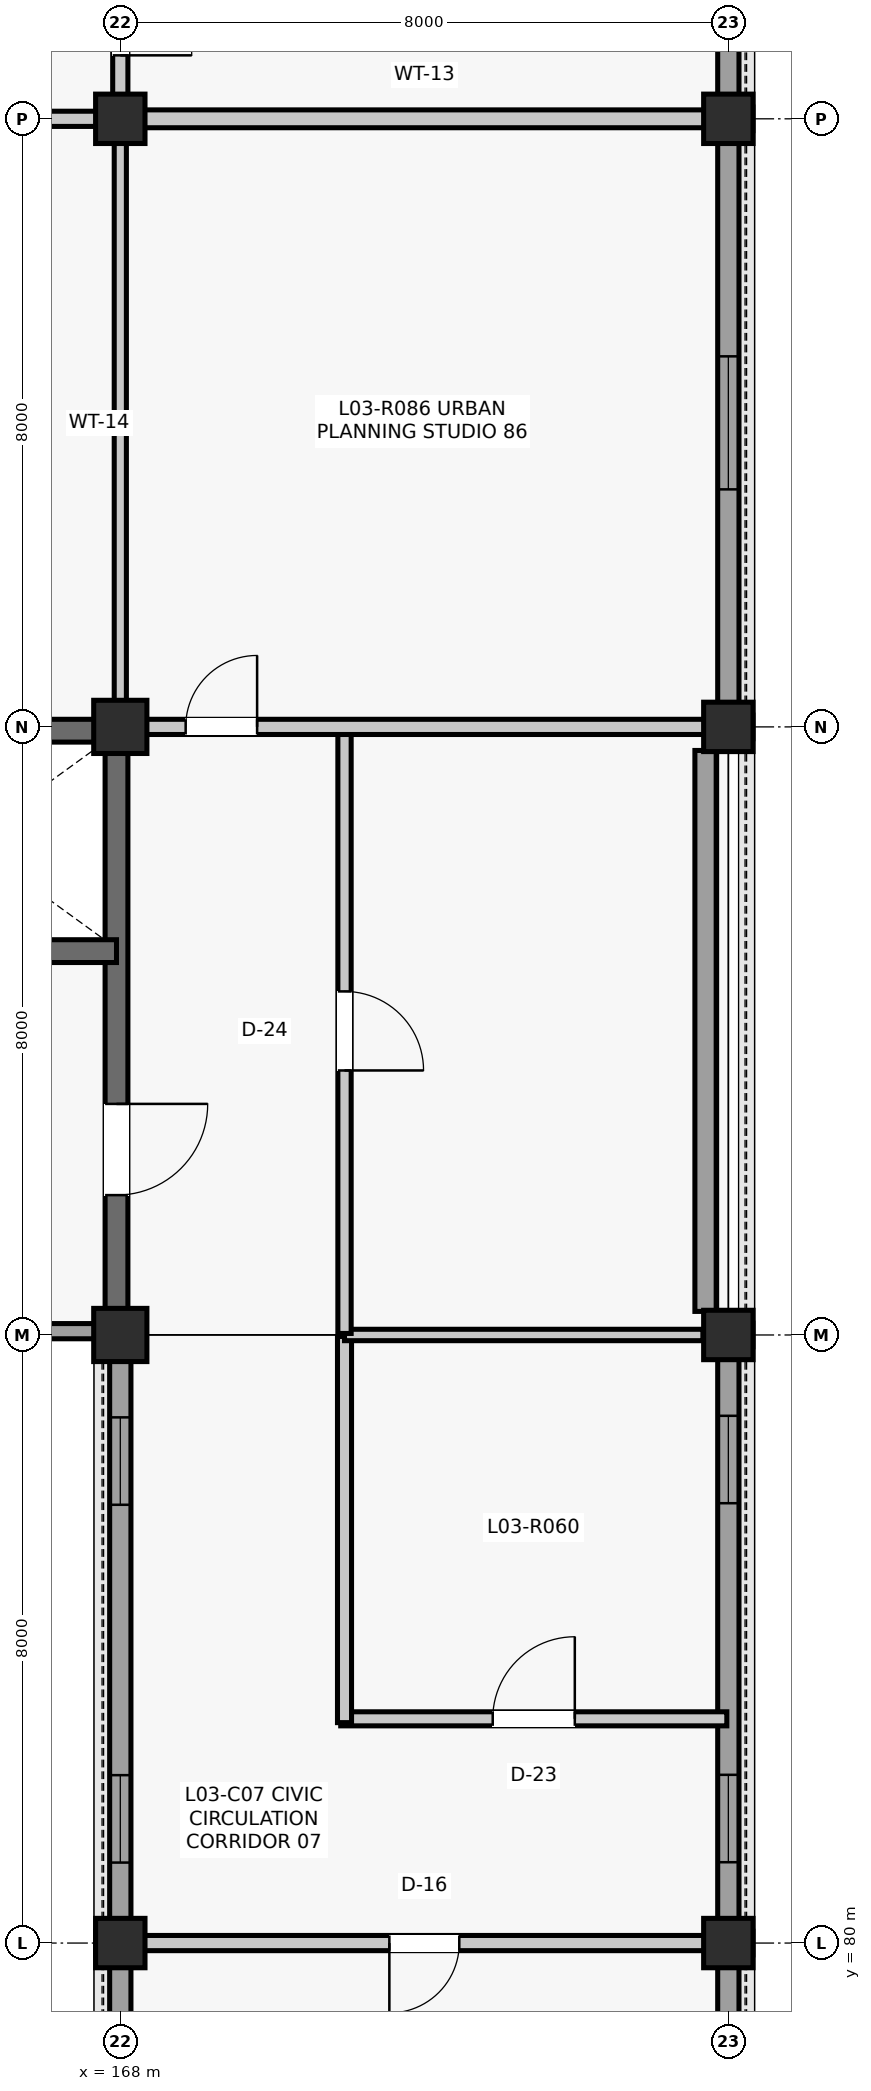
"""IFC4 building model, lengths in metres.
Left out: names, types, materials, properties, quantities, classifications, styles, units other than length and angle.
Written with IfcOpenShell. Run it as: python <this file> out.ifc"""

import sys

from ifc_helpers import new_model, si_unit, direction, frame, frame_2d, origin, origin_2d, place, context, subcontext, project, spatial, rectangle, extrude, element, fill, save


model = new_model("IFC4")
c1 = context("Model", 3, precision=1e-05, world=origin(), true_north=direction((0.0, 1.0)))
c2 = subcontext(c1, "Body", "Model", "MODEL_VIEW")
j1 = project(units=[si_unit("LENGTHUNIT", "METRE"), si_unit("PLANEANGLEUNIT", "RADIAN")], contexts=[c1])
p1 = place(None, origin())
s1 = spatial("IfcSite", under=j1, at=p1, CompositionType="ELEMENT")
p2 = place(p1, origin())
s2 = spatial("IfcBuilding", under=s1, at=p2, CompositionType="ELEMENT")
p3 = place(p2, frame((0.0, 0.0, 13.86)))
s3 = spatial("IfcBuildingStorey", under=s2, at=p3, CompositionType="ELEMENT", Elevation=13.86)
p4 = place(p3, frame((168.0, 80.0, 0.0), z_axis=(0.0, 0.0, 1.0), x_axis=(1.0, 0.0, 0.0)))
e1 = element("IfcColumn", 1, at=p4, inside=s3, PredefinedType="COLUMN", context=c2, shape_type="SweptSolid", body=[
    extrude(rectangle(XDim=0.65, YDim=0.65, at=origin_2d()), origin(), (0.0, 0.0, 1.0), 3.96),
])
for number, where, z_axis, x_axis in (
    (2, (168.0, 88.0, 0.0), (0.0, 0.0, 1.0), (1.0, 0.0, 0.0)),
    (3, (168.0, 96.0, 0.0), (0.0, 0.0, 1.0), (1.0, 0.0, 0.0)),
):
    element("IfcColumn", number, at=place(p3, frame(where, z_axis=z_axis, x_axis=x_axis)), inside=s3, PredefinedType="COLUMN", context=c2, shape_type="SweptSolid", body=[
        extrude(rectangle(XDim=0.7, YDim=0.7, at=origin_2d()), origin(), (0.0, 0.0, 1.0), 3.96),
    ])
for number, where, z_axis, x_axis in (
    (4, (168.0, 104.0, 0.0), (0.0, 0.0, 1.0), (1.0, 0.0, 0.0)),
    (5, (176.0, 80.0, 0.0), (0.0, 0.0, 1.0), (1.0, 0.0, 0.0)),
    (6, (176.0, 88.0, 0.0), (0.0, 0.0, 1.0), (1.0, 0.0, 0.0)),
    (7, (176.0, 96.0, 0.0), (0.0, 0.0, 1.0), (1.0, 0.0, 0.0)),
    (8, (176.0, 104.0, 0.0), (0.0, 0.0, 1.0), (1.0, 0.0, 0.0)),
):
    element("IfcColumn", number, at=place(p3, frame(where, z_axis=z_axis, x_axis=x_axis)), inside=s3, PredefinedType="COLUMN", context=c2, shape_type="SweptSolid", body=[
        extrude(rectangle(XDim=0.65, YDim=0.65, at=origin_2d()), origin(), (0.0, 0.0, 1.0), 3.96),
    ])
p5 = place(p3, frame((168.0, 72.26, 0.0), z_axis=(0.0, 0.0, 1.0), x_axis=(0.0, 1.0, 0.0)))
e9 = element("IfcWall", 9, at=p5, inside=s3, PredefinedType="SOLIDWALL", context=c2, shape_type="SweptSolid", body=[
    extrude(rectangle(XDim=7.43, YDim=0.28, at=frame_2d((3.715, 0.0))), origin(), (0.0, 0.0, 1.0), 3.364),
])
p6 = place(p5, frame((2.615, 0.0, 1.35)))
e10 = element("IfcOpeningElement", 10, at=p6, cuts=e9, PredefinedType="OPENING", context=c2, shape_type="SweptSolid", body=[
    extrude(rectangle(XDim=2.2, YDim=1.3, at=frame_2d((1.1, 0.65))), frame((0.0, 0.15, 0.0), z_axis=(0.0, -1.0, 0.0), x_axis=(1.0, 0.0, 0.0)), (0.0, 0.0, 1.0), 0.3),
])
p7 = place(p3, frame((176.0, 72.26, 0.0), z_axis=(0.0, 0.0, 1.0), x_axis=(0.0, 1.0, 0.0)))
e11 = element("IfcWall", 11, at=p7, inside=s3, PredefinedType="SOLIDWALL", context=c2, shape_type="SweptSolid", body=[
    extrude(rectangle(XDim=7.43, YDim=0.28, at=frame_2d((3.715, 0.0))), origin(), (0.0, 0.0, 1.0), 3.304),
])
p8 = place(p7, frame((2.615, 0.0, 1.35)))
e12 = element("IfcOpeningElement", 12, at=p8, cuts=e11, PredefinedType="OPENING", context=c2, shape_type="SweptSolid", body=[
    extrude(rectangle(XDim=2.2, YDim=1.3, at=frame_2d((1.1, 0.65))), frame((0.0, 0.15, 0.0), z_axis=(0.0, -1.0, 0.0), x_axis=(1.0, 0.0, 0.0)), (0.0, 0.0, 1.0), 0.3),
])
p9 = place(p3, frame((168.0, 80.31, 0.0), z_axis=(0.0, 0.0, 1.0), x_axis=(0.0, 1.0, 0.0)))
e13 = element("IfcWall", 13, at=p9, inside=s3, PredefinedType="SOLIDWALL", context=c2, shape_type="SweptSolid", body=[
    extrude(rectangle(XDim=7.355, YDim=0.28, at=frame_2d((3.677, 0.0))), origin(), (0.0, 0.0, 1.0), 3.304),
])
p10 = place(p9, frame((0.749, 0.0, 0.95)))
e14 = element("IfcOpeningElement", 14, at=p10, cuts=e13, PredefinedType="OPENING", context=c2, shape_type="SweptSolid", body=[
    extrude(rectangle(XDim=1.15, YDim=1.65, at=frame_2d((0.575, 0.825))), frame((0.0, 0.15, 0.0), z_axis=(0.0, -1.0, 0.0), x_axis=(1.0, 0.0, 0.0)), (0.0, 0.0, 1.0), 0.3),
])
p11 = place(p9, frame((5.456, 0.0, 0.95)))
e15 = element("IfcOpeningElement", 15, at=p11, cuts=e13, PredefinedType="OPENING", context=c2, shape_type="SweptSolid", body=[
    extrude(rectangle(XDim=1.15, YDim=1.65, at=frame_2d((0.575, 0.825))), frame((0.0, 0.15, 0.0), z_axis=(0.0, -1.0, 0.0), x_axis=(1.0, 0.0, 0.0)), (0.0, 0.0, 1.0), 0.3),
])
p12 = place(p3, frame((176.0, 80.31, 0.0), z_axis=(0.0, 0.0, 1.0), x_axis=(0.0, 1.0, 0.0)))
e16 = element("IfcWall", 16, at=p12, inside=s3, PredefinedType="SOLIDWALL", context=c2, shape_type="SweptSolid", body=[
    extrude(rectangle(XDim=7.38, YDim=0.28, at=frame_2d((3.69, 0.0))), origin(), (0.0, 0.0, 1.0), 3.367),
])
p13 = place(p12, frame((0.753, 0.0, 0.95)))
e17 = element("IfcOpeningElement", 17, at=p13, cuts=e16, PredefinedType="OPENING", context=c2, shape_type="SweptSolid", body=[
    extrude(rectangle(XDim=1.15, YDim=1.65, at=frame_2d((0.575, 0.825))), frame((0.0, 0.15, 0.0), z_axis=(0.0, -1.0, 0.0), x_axis=(1.0, 0.0, 0.0)), (0.0, 0.0, 1.0), 0.3),
])
p14 = place(p12, frame((5.477, 0.0, 0.95)))
e18 = element("IfcOpeningElement", 18, at=p14, cuts=e16, PredefinedType="OPENING", context=c2, shape_type="SweptSolid", body=[
    extrude(rectangle(XDim=1.15, YDim=1.65, at=frame_2d((0.575, 0.825))), frame((0.0, 0.15, 0.0), z_axis=(0.0, -1.0, 0.0), x_axis=(1.0, 0.0, 0.0)), (0.0, 0.0, 1.0), 0.3),
])
p15 = place(p3, frame((175.7, 88.31, 0.0), z_axis=(0.0, 0.0, 1.0), x_axis=(0.0, 1.0, 0.0)))
e19 = element("IfcWall", 19, at=p15, inside=s3, PredefinedType="SOLIDWALL", context=c2, shape_type="SweptSolid", body=[
    extrude(rectangle(XDim=7.38, YDim=0.28, at=frame_2d((3.69, 0.0))), origin(), (0.0, 0.0, 1.0), 3.3),
])
p16 = place(p3, frame((176.0, 96.31, 0.0), z_axis=(0.0, 0.0, 1.0), x_axis=(0.0, 1.0, 0.0)))
e20 = element("IfcWall", 20, at=p16, inside=s3, PredefinedType="SOLIDWALL", context=c2, shape_type="SweptSolid", body=[
    extrude(rectangle(XDim=7.38, YDim=0.28, at=frame_2d((3.69, 0.0))), origin(), (0.0, 0.0, 1.0), 3.364),
])
p17 = place(p16, frame((2.815, 0.0, 0.9)))
e21 = element("IfcOpeningElement", 21, at=p17, cuts=e20, PredefinedType="OPENING", context=c2, shape_type="SweptSolid", body=[
    extrude(rectangle(XDim=1.75, YDim=1.85, at=frame_2d((0.875, 0.925))), frame((0.0, 0.15, 0.0), z_axis=(0.0, -1.0, 0.0), x_axis=(1.0, 0.0, 0.0)), (0.0, 0.0, 1.0), 0.3),
])
p18 = place(p3, frame((176.0, 104.31, 0.0), z_axis=(0.0, 0.0, 1.0), x_axis=(0.0, 1.0, 0.0)))
e22 = element("IfcWall", 22, at=p18, inside=s3, PredefinedType="SOLIDWALL", context=c2, shape_type="SweptSolid", body=[
    extrude(rectangle(XDim=7.38, YDim=0.28, at=frame_2d((3.69, 0.0))), origin(), (0.0, 0.0, 1.0), 3.304),
])
p19 = place(p18, frame((2.59, 0.0, 1.35)))
e23 = element("IfcOpeningElement", 23, at=p19, cuts=e22, PredefinedType="OPENING", context=c2, shape_type="SweptSolid", body=[
    extrude(rectangle(XDim=2.2, YDim=1.3, at=frame_2d((1.1, 0.65))), frame((0.0, 0.15, 0.0), z_axis=(0.0, -1.0, 0.0), x_axis=(1.0, 0.0, 0.0)), (0.0, 0.0, 1.0), 0.3),
])
p20 = place(p3, frame((160.24, 95.95, 0.0), z_axis=(0.0, 0.0, 1.0), x_axis=(1.0, 0.0, 0.0)))
e24 = element("IfcWall", 24, at=p20, inside=s3, PredefinedType="SHEAR", context=c2, shape_type="SweptSolid", body=[
    extrude(rectangle(XDim=7.52, YDim=0.3, at=frame_2d((3.76, 0.0))), origin(), (0.0, 0.0, 1.0), 3.725),
])
p21 = place(p3, frame((167.95, 88.24, 0.0), z_axis=(0.0, 0.0, 1.0), x_axis=(0.0, 1.0, 0.0)))
e25 = element("IfcWall", 25, at=p21, inside=s3, PredefinedType="SHEAR", context=c2, shape_type="SweptSolid", body=[
    extrude(rectangle(XDim=7.52, YDim=0.3, at=frame_2d((3.76, 0.0))), origin(), (0.0, 0.0, 1.0), 3.725),
])
p22 = place(p21, frame((1.6, 0.0, 0.0)))
e26 = element("IfcOpeningElement", 26, at=p22, cuts=e25, PredefinedType="OPENING", context=c2, shape_type="SweptSolid", body=[
    extrude(rectangle(XDim=1.2, YDim=2.15, at=frame_2d((0.6, 1.075))), frame((0.0, 0.16, 0.0), z_axis=(0.0, -1.0, 0.0), x_axis=(1.0, 0.0, 0.0)), (0.0, 0.0, 1.0), 0.32),
])
p23 = place(p3, frame((164.0, 93.05, 0.0), z_axis=(0.0, 0.0, 1.0), x_axis=(1.0, 0.0, 0.0)))
e27 = element("IfcWall", 27, at=p23, inside=s3, PredefinedType="SHEAR", context=c2, shape_type="SweptSolid", body=[
    extrude(rectangle(XDim=3.95, YDim=0.3, at=frame_2d((1.975, 0.0))), origin(), (0.0, 0.0, 1.0), 3.725),
])
p24 = place(p23, frame((1.375, 0.0, 0.0)))
e28 = element("IfcOpeningElement", 28, at=p24, cuts=e27, PredefinedType="OPENING", context=c2, shape_type="SweptSolid", body=[
    extrude(rectangle(XDim=1.2, YDim=2.2, at=frame_2d((0.6, 1.1))), frame((0.0, 0.16, 0.0), z_axis=(0.0, -1.0, 0.0), x_axis=(1.0, 0.0, 0.0)), (0.0, 0.0, 1.0), 0.32),
])
p25 = place(p3, frame((164.0, 88.05, 0.0), z_axis=(0.0, 0.0, 1.0), x_axis=(1.0, 0.0, 0.0)))
e29 = element("IfcWall", 29, at=p25, inside=s3, PredefinedType="PARTITIONING", context=c2, shape_type="SweptSolid", body=[
    extrude(rectangle(XDim=3.66, YDim=0.2, at=frame_2d((1.83, 0.0))), origin(), (0.0, 0.0, 1.0), 3.297),
])
p26 = place(p3, frame((170.9, 82.95, 0.0), z_axis=(0.0, 0.0, 1.0), x_axis=(1.0, 0.0, 0.0)))
e30 = element("IfcWall", 30, at=p26, inside=s3, PredefinedType="PARTITIONING", context=c2, shape_type="SweptSolid", body=[
    extrude(rectangle(XDim=5.08, YDim=0.185, at=frame_2d((2.54, 0.0))), origin(), (0.0, 0.0, 1.0), 3.36),
])
p27 = place(p26, frame((2.0, 0.0, 0.0)))
e31 = element("IfcOpeningElement", 31, at=p27, cuts=e30, PredefinedType="OPENING", context=c2, shape_type="SweptSolid", body=[
    extrude(rectangle(XDim=1.08, YDim=2.2, at=frame_2d((0.54, 1.1))), frame((0.0, 0.103, 0.0), z_axis=(0.0, -1.0, 0.0), x_axis=(1.0, 0.0, 0.0)), (0.0, 0.0, 1.0), 0.205),
])
p28 = place(p3, frame((170.95, 82.9, 0.0), z_axis=(0.0, 0.0, 1.0), x_axis=(0.0, 1.0, 0.0)))
e32 = element("IfcWall", 32, at=p28, inside=s3, PredefinedType="PARTITIONING", context=c2, shape_type="SweptSolid", body=[
    extrude(rectangle(XDim=5.08, YDim=0.185, at=frame_2d((2.54, 0.0))), origin(), (0.0, 0.0, 1.0), 3.247),
])
p29 = place(p3, frame((170.95, 88.0, 0.0), z_axis=(0.0, 0.0, 1.0), x_axis=(1.0, 0.0, 0.0)))
e33 = element("IfcWall", 33, at=p29, inside=s3, PredefinedType="PARTITIONING", context=c2, shape_type="SweptSolid", body=[
    extrude(rectangle(XDim=4.715, YDim=0.15, at=frame_2d((2.357, 0.0))), origin(), (0.0, 0.0, 1.0), 3.247),
])
p30 = place(p3, frame((170.95, 88.02, 0.0), z_axis=(0.0, 0.0, 1.0), x_axis=(0.0, 1.0, 0.0)))
e34 = element("IfcWall", 34, at=p30, inside=s3, PredefinedType="PARTITIONING", context=c2, shape_type="SweptSolid", body=[
    extrude(rectangle(XDim=7.96, YDim=0.175, at=frame_2d((3.98, 0.0))), origin(), (0.0, 0.0, 1.0), 3.247),
])
p31 = place(p30, frame((3.46, 0.0, 0.0)))
e35 = element("IfcOpeningElement", 35, at=p31, cuts=e34, PredefinedType="OPENING", context=c2, shape_type="SweptSolid", body=[
    extrude(rectangle(XDim=1.04, YDim=2.18, at=frame_2d((0.52, 1.09))), frame((0.0, 0.097, 0.0), z_axis=(0.0, -1.0, 0.0), x_axis=(1.0, 0.0, 0.0)), (0.0, 0.0, 1.0), 0.195),
])
p32 = place(p3, frame((168.0, 96.34, 0.0), z_axis=(0.0, 0.0, 1.0), x_axis=(0.0, 1.0, 0.0)))
e36 = element("IfcWall", 36, at=p32, inside=s3, PredefinedType="PARTITIONING", context=c2, shape_type="SweptSolid", body=[
    extrude(rectangle(XDim=7.345, YDim=0.16, at=frame_2d((3.672, 0.0))), origin(), (0.0, 0.0, 1.0), 3.247),
])
p33 = place(p3, frame((160.315, 104.0, 0.0), z_axis=(0.0, 0.0, 1.0), x_axis=(1.0, 0.0, 0.0)))
e37 = element("IfcWall", 37, at=p33, inside=s3, PredefinedType="PARTITIONING", context=c2, shape_type="SweptSolid", body=[
    extrude(rectangle(XDim=7.37, YDim=0.2, at=frame_2d((3.685, 0.0))), origin(), (0.0, 0.0, 1.0), 3.253),
])
p34 = place(p33, frame((1.367, 0.0, 0.0)))
e38 = element("IfcOpeningElement", 38, at=p34, cuts=e37, PredefinedType="OPENING", context=c2, shape_type="SweptSolid", body=[
    extrude(rectangle(XDim=0.95, YDim=2.1, at=frame_2d((0.475, 1.05))), frame((0.0, 0.11, 0.0), z_axis=(0.0, -1.0, 0.0), x_axis=(1.0, 0.0, 0.0)), (0.0, 0.0, 1.0), 0.22),
])
p35 = place(p33, frame((5.421, 0.0, 0.0)))
e39 = element("IfcOpeningElement", 39, at=p35, cuts=e37, PredefinedType="OPENING", context=c2, shape_type="SweptSolid", body=[
    extrude(rectangle(XDim=0.95, YDim=2.1, at=frame_2d((0.475, 1.05))), frame((0.0, 0.11, 0.0), z_axis=(0.0, -1.0, 0.0), x_axis=(1.0, 0.0, 0.0)), (0.0, 0.0, 1.0), 0.22),
])
p36 = place(p3, frame((168.0, 104.315, 0.0), z_axis=(0.0, 0.0, 1.0), x_axis=(0.0, 1.0, 0.0)))
e40 = element("IfcWall", 40, at=p36, inside=s3, PredefinedType="PARTITIONING", context=c2, shape_type="SweptSolid", body=[
    extrude(rectangle(XDim=7.37, YDim=0.2, at=frame_2d((3.685, 0.0))), origin(), (0.0, 0.0, 1.0), 3.253),
])
p37 = place(p36, frame((0.52, 0.0, 0.0)))
e41 = element("IfcOpeningElement", 41, at=p37, cuts=e40, PredefinedType="OPENING", context=c2, shape_type="SweptSolid", body=[
    extrude(rectangle(XDim=0.94, YDim=2.12, at=frame_2d((0.47, 1.06))), frame((0.0, 0.11, 0.0), z_axis=(0.0, -1.0, 0.0), x_axis=(1.0, 0.0, 0.0)), (0.0, 0.0, 1.0), 0.22),
])
p38 = place(p3, frame((168.315, 80.0, 0.0), z_axis=(0.0, 0.0, 1.0), x_axis=(1.0, 0.0, 0.0)))
e42 = element("IfcWall", 42, at=p38, inside=s3, PredefinedType="PARTITIONING", context=c2, shape_type="SweptSolid", body=[
    extrude(rectangle(XDim=7.37, YDim=0.2, at=frame_2d((3.685, 0.0))), origin(), (0.0, 0.0, 1.0), 3.452),
])
p39 = place(p38, frame((3.225, 0.0, 0.0)))
e43 = element("IfcOpeningElement", 43, at=p39, cuts=e42, PredefinedType="OPENING", context=c2, shape_type="SweptSolid", body=[
    extrude(rectangle(XDim=0.92, YDim=2.1, at=frame_2d((0.46, 1.05))), frame((0.0, 0.11, 0.0), z_axis=(0.0, -1.0, 0.0), x_axis=(1.0, 0.0, 0.0)), (0.0, 0.0, 1.0), 0.22),
])
p40 = place(p3, frame((168.34, 96.0, 0.0), z_axis=(0.0, 0.0, 1.0), x_axis=(1.0, 0.0, 0.0)))
e44 = element("IfcWall", 44, at=p40, inside=s3, PredefinedType="PARTITIONING", context=c2, shape_type="SweptSolid", body=[
    extrude(rectangle(XDim=7.345, YDim=0.2, at=frame_2d((3.672, 0.0))), origin(), (0.0, 0.0, 1.0), 3.253),
])
p41 = place(p40, frame((0.52, 0.0, 0.0)))
e45 = element("IfcOpeningElement", 45, at=p41, cuts=e44, PredefinedType="OPENING", context=c2, shape_type="SweptSolid", body=[
    extrude(rectangle(XDim=0.94, YDim=2.12, at=frame_2d((0.47, 1.06))), frame((0.0, 0.11, 0.0), z_axis=(0.0, -1.0, 0.0), x_axis=(1.0, 0.0, 0.0)), (0.0, 0.0, 1.0), 0.22),
])
p42 = place(p3, frame((168.315, 104.0, 0.0), z_axis=(0.0, 0.0, 1.0), x_axis=(1.0, 0.0, 0.0)))
e46 = element("IfcWall", 46, at=p42, inside=s3, PredefinedType="PARTITIONING", context=c2, shape_type="SweptSolid", body=[
    extrude(rectangle(XDim=7.37, YDim=0.235, at=frame_2d((3.685, 0.0))), origin(), (0.0, 0.0, 1.0), 3.241),
])
p43 = place(p10, origin())
e47 = element("IfcWindow", 47, at=p43, inside=s3, PartitioningType="SINGLE_PANEL", PredefinedType="WINDOW", context=c2, shape_type="SweptSolid", body=[
    extrude(rectangle(XDim=1.15, YDim=1.65, at=frame_2d((0.575, 0.825))), frame((0.0, 0.03, 0.0), z_axis=(0.0, -1.0, 0.0), x_axis=(1.0, 0.0, 0.0)), (0.0, 0.0, 1.0), 0.06),
])
fill(e14, e47)
p44 = place(p11, origin())
e48 = element("IfcWindow", 48, at=p44, inside=s3, PartitioningType="SINGLE_PANEL", PredefinedType="WINDOW", context=c2, shape_type="SweptSolid", body=[
    extrude(rectangle(XDim=1.15, YDim=1.65, at=frame_2d((0.575, 0.825))), frame((0.0, 0.03, 0.0), z_axis=(0.0, -1.0, 0.0), x_axis=(1.0, 0.0, 0.0)), (0.0, 0.0, 1.0), 0.06),
])
fill(e15, e48)
p45 = place(p13, origin())
e49 = element("IfcWindow", 49, at=p45, inside=s3, PartitioningType="SINGLE_PANEL", PredefinedType="WINDOW", context=c2, shape_type="SweptSolid", body=[
    extrude(rectangle(XDim=1.15, YDim=1.65, at=frame_2d((0.575, 0.825))), frame((0.0, 0.03, 0.0), z_axis=(0.0, -1.0, 0.0), x_axis=(1.0, 0.0, 0.0)), (0.0, 0.0, 1.0), 0.06),
])
fill(e17, e49)
p46 = place(p14, origin())
e50 = element("IfcWindow", 50, at=p46, inside=s3, PartitioningType="SINGLE_PANEL", PredefinedType="WINDOW", context=c2, shape_type="SweptSolid", body=[
    extrude(rectangle(XDim=1.15, YDim=1.65, at=frame_2d((0.575, 0.825))), frame((0.0, 0.03, 0.0), z_axis=(0.0, -1.0, 0.0), x_axis=(1.0, 0.0, 0.0)), (0.0, 0.0, 1.0), 0.06),
])
fill(e18, e50)
p47 = place(p17, origin())
e51 = element("IfcWindow", 51, at=p47, inside=s3, PartitioningType="SINGLE_PANEL", PredefinedType="WINDOW", context=c2, shape_type="SweptSolid", body=[
    extrude(rectangle(XDim=1.75, YDim=1.85, at=frame_2d((0.875, 0.925))), frame((0.0, 0.03, 0.0), z_axis=(0.0, -1.0, 0.0), x_axis=(1.0, 0.0, 0.0)), (0.0, 0.0, 1.0), 0.06),
])
fill(e21, e51)
p48 = place(p22, frame((1.2, 0.0, 0.0), z_axis=(0.0, 0.0, 1.0), x_axis=(-1.0, 0.0, 0.0)))
e52 = element("IfcDoor", 52, at=p48, inside=s3, OperationType="SINGLE_SWING_RIGHT", PredefinedType="DOOR", context=c2, shape_type="SweptSolid", body=[
    extrude(rectangle(XDim=1.2, YDim=2.15, at=frame_2d((0.6, 1.075))), frame((0.0, 0.025, 0.0), z_axis=(0.0, -1.0, 0.0), x_axis=(1.0, 0.0, 0.0)), (0.0, 0.0, 1.0), 0.05),
])
fill(e26, e52)
p49 = place(p27, origin())
e53 = element("IfcDoor", 53, at=p49, inside=s3, OperationType="SINGLE_SWING_RIGHT", PredefinedType="DOOR", context=c2, shape_type="SweptSolid", body=[
    extrude(rectangle(XDim=1.08, YDim=2.2, at=frame_2d((0.54, 1.1))), frame((0.0, 0.025, 0.0), z_axis=(0.0, -1.0, 0.0), x_axis=(1.0, 0.0, 0.0)), (0.0, 0.0, 1.0), 0.05),
])
fill(e31, e53)
p50 = place(p31, frame((1.04, 0.0, 0.0), z_axis=(0.0, 0.0, 1.0), x_axis=(-1.0, 0.0, 0.0)))
e54 = element("IfcDoor", 54, at=p50, inside=s3, OperationType="SINGLE_SWING_LEFT", PredefinedType="DOOR", context=c2, shape_type="SweptSolid", body=[
    extrude(rectangle(XDim=1.04, YDim=2.18, at=frame_2d((0.52, 1.09))), frame((0.0, 0.025, 0.0), z_axis=(0.0, -1.0, 0.0), x_axis=(1.0, 0.0, 0.0)), (0.0, 0.0, 1.0), 0.05),
])
fill(e35, e54)
p51 = place(p37, frame((0.94, 0.0, 0.0), z_axis=(0.0, 0.0, 1.0), x_axis=(-1.0, 0.0, 0.0)))
e55 = element("IfcDoor", 55, at=p51, inside=s3, OperationType="SINGLE_SWING_LEFT", PredefinedType="DOOR", context=c2, shape_type="SweptSolid", body=[
    extrude(rectangle(XDim=0.94, YDim=2.12, at=frame_2d((0.47, 1.06))), frame((0.0, 0.025, 0.0), z_axis=(0.0, -1.0, 0.0), x_axis=(1.0, 0.0, 0.0)), (0.0, 0.0, 1.0), 0.05),
])
fill(e41, e55)
p52 = place(p39, frame((0.92, 0.0, 0.0), z_axis=(0.0, 0.0, 1.0), x_axis=(-1.0, 0.0, 0.0)))
e56 = element("IfcDoor", 56, at=p52, inside=s3, OperationType="SINGLE_SWING_LEFT", PredefinedType="DOOR", context=c2, shape_type="SweptSolid", body=[
    extrude(rectangle(XDim=0.92, YDim=2.1, at=frame_2d((0.46, 1.05))), frame((0.0, 0.025, 0.0), z_axis=(0.0, -1.0, 0.0), x_axis=(1.0, 0.0, 0.0)), (0.0, 0.0, 1.0), 0.05),
])
fill(e43, e56)
p53 = place(p41, origin())
e57 = element("IfcDoor", 57, at=p53, inside=s3, OperationType="SINGLE_SWING_RIGHT", PredefinedType="DOOR", context=c2, shape_type="SweptSolid", body=[
    extrude(rectangle(XDim=0.94, YDim=2.12, at=frame_2d((0.47, 1.06))), frame((0.0, 0.025, 0.0), z_axis=(0.0, -1.0, 0.0), x_axis=(1.0, 0.0, 0.0)), (0.0, 0.0, 1.0), 0.05),
])
fill(e45, e57)
save(model, sys.argv[1])
